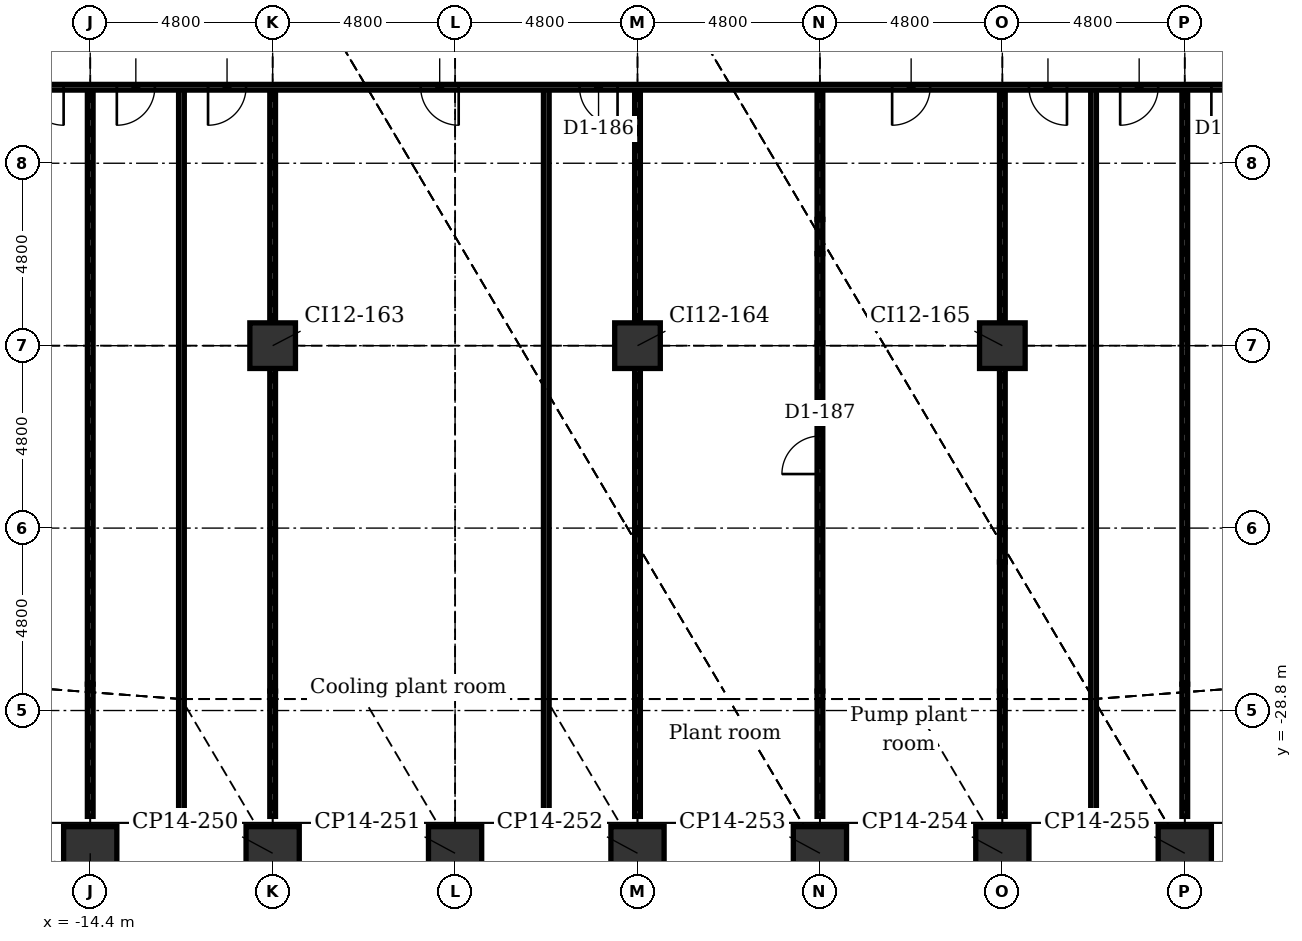
"""IFC4 building model, lengths in metres.
Left out: names, types, materials, properties, quantities, classifications, styles, units other than length and angle.
Written with IfcOpenShell. Run it as: python <this file> out.ifc"""

import sys

from ifc_helpers import new_model, si_unit, direction, frame, frame_2d, origin, origin_2d, place, context, subcontext, project, spatial, rectangle, extrude, element, fill, save


model = new_model("IFC4")
c1 = context("Model", 3, precision=1e-05, world=origin(), true_north=direction((0.0, 1.0)))
c2 = subcontext(c1, "Body", "Model", "MODEL_VIEW")
j1 = project(units=[si_unit("LENGTHUNIT", "METRE"), si_unit("PLANEANGLEUNIT", "RADIAN")], contexts=[c1])
p1 = place(None, origin())
s1 = spatial("IfcSite", under=j1, at=p1, CompositionType="ELEMENT")
p2 = place(p1, origin())
s2 = spatial("IfcBuilding", under=s1, at=p2, CompositionType="ELEMENT")
p3 = place(p2, frame((0.0, 0.0, 71.9)))
s3 = spatial("IfcBuildingStorey", under=s2, at=p3, CompositionType="ELEMENT", Elevation=71.9)
for number, where, z_axis, x_axis in (
    (1, (14.4, -32.555, -0.3), (0.0, 0.0, 1.0), (1.0, 0.0, 0.0)),
    (2, (9.6, -32.555, -0.3), (0.0, 0.0, 1.0), (1.0, 0.0, 0.0)),
    (3, (4.8, -32.555, -0.3), (0.0, 0.0, 1.0), (1.0, 0.0, 0.0)),
    (4, (0.0, -32.555, -0.3), (0.0, 0.0, 1.0), (1.0, 0.0, 0.0)),
    (5, (-4.8, -32.555, -0.3), (0.0, 0.0, 1.0), (1.0, 0.0, 0.0)),
    (6, (-9.6, -32.555, -0.3), (0.0, 0.0, 1.0), (1.0, 0.0, 0.0)),
    (7, (-14.4, -32.555, -0.3), (0.0, 0.0, 1.0), (1.0, 0.0, 0.0)),
):
    element("IfcColumn", number, at=place(p3, frame(where, z_axis=z_axis, x_axis=x_axis)), inside=s3, PredefinedType="COLUMN", context=c2, shape_type="SweptSolid", body=[
        extrude(rectangle(XDim=1.4, YDim=1.4, at=origin_2d()), origin(), (0.0, 0.0, 1.0), 6.1),
    ])
for number, where, z_axis, x_axis in (
    (8, (-9.6, -19.2, -0.3), (0.0, 0.0, 1.0), (1.0, 0.0, 0.0)),
    (9, (0.0, -19.2, -0.3), (0.0, 0.0, 1.0), (1.0, 0.0, 0.0)),
    (10, (9.6, -19.2, -0.3), (0.0, 0.0, 1.0), (1.0, 0.0, 0.0)),
):
    element("IfcColumn", number, at=place(p3, frame(where, z_axis=z_axis, x_axis=x_axis)), inside=s3, PredefinedType="COLUMN", context=c2, shape_type="SweptSolid", body=[
        extrude(rectangle(XDim=1.2, YDim=1.2, at=origin_2d()), origin(), (0.0, 0.0, 1.0), 6.1),
    ])
p4 = place(p3, frame((14.4, -28.107, 0.0), z_axis=(0.0, 0.0, 1.0), x_axis=(0.0, 1.0, 0.0)))
e11 = element("IfcWall", 11, at=p4, inside=s3, PredefinedType="PARTITIONING", context=c2, shape_type="SweptSolid", body=[
    extrude(rectangle(XDim=15.707, YDim=0.15, at=frame_2d((7.854, 0.0))), origin(), (0.0, 0.0, 1.0), 5.343),
])
p5 = place(p3, frame((14.4, -31.585, 0.0), z_axis=(0.0, 0.0, 1.0), x_axis=(0.0, 1.0, 0.0)))
e12 = element("IfcWall", 12, at=p5, inside=s3, PredefinedType="PARTITIONING", context=c2, shape_type="SweptSolid", body=[
    extrude(rectangle(XDim=3.479, YDim=0.15, at=frame_2d((1.739, 0.0))), origin(), (0.0, 0.0, 1.0), 5.8),
])
p6 = place(p3, frame((12.0, -31.585, 0.0), z_axis=(0.0, 0.0, 1.0), x_axis=(0.0, 1.0, 0.0)))
e13 = element("IfcWall", 13, at=p6, inside=s3, PredefinedType="PARTITIONING", context=c2, shape_type="SweptSolid", body=[
    extrude(rectangle(XDim=19.186, YDim=0.15, at=frame_2d((9.593, 0.0))), origin(), (0.0, 0.0, 1.0), 5.8),
])
p7 = place(p3, frame((9.6, -23.99, 0.0), z_axis=(0.0, 0.0, 1.0), x_axis=(0.0, 1.0, 0.0)))
e14 = element("IfcWall", 14, at=p7, inside=s3, PredefinedType="PARTITIONING", context=c2, shape_type="SweptSolid", body=[
    extrude(rectangle(XDim=4.19, YDim=0.15, at=frame_2d((2.095, 0.0))), origin(), (0.0, 0.0, 1.0), 5.49),
])
p8 = place(p3, frame((9.6, -31.585, 0.0), z_axis=(0.0, 0.0, 1.0), x_axis=(0.0, 1.0, 0.0)))
e15 = element("IfcWall", 15, at=p8, inside=s3, PredefinedType="PARTITIONING", context=c2, shape_type="SweptSolid", body=[
    extrude(rectangle(XDim=3.297, YDim=0.15, at=frame_2d((1.648, 0.0))), origin(), (0.0, 0.0, 1.0), 5.8),
])
p9 = place(p3, frame((9.6, -28.289, 0.0), z_axis=(0.0, 0.0, 1.0), x_axis=(0.0, 1.0, 0.0)))
e16 = element("IfcWall", 16, at=p9, inside=s3, PredefinedType="PARTITIONING", context=c2, shape_type="SweptSolid", body=[
    extrude(rectangle(XDim=3.396, YDim=0.15, at=frame_2d((1.698, 0.0))), origin(), (0.0, 0.0, 1.0), 5.49),
])
p10 = place(p3, frame((9.6, -24.893, 0.0), z_axis=(0.0, 0.0, 1.0), x_axis=(0.0, 1.0, 0.0)))
e17 = element("IfcWall", 17, at=p10, inside=s3, PredefinedType="PARTITIONING", context=c2, shape_type="SweptSolid", body=[
    extrude(rectangle(XDim=0.902, YDim=0.15, at=frame_2d((0.451, 0.0))), origin(), (0.0, 0.0, 1.0), 5.8),
])
p11 = place(p3, frame((9.6, -18.6, 0.0), z_axis=(0.0, 0.0, 1.0), x_axis=(0.0, 1.0, 0.0)))
e18 = element("IfcWall", 18, at=p11, inside=s3, PredefinedType="PARTITIONING", context=c2, shape_type="SweptSolid", body=[
    extrude(rectangle(XDim=6.2, YDim=0.15, at=frame_2d((3.1, 0.0))), origin(), (0.0, 0.0, 1.0), 5.343),
])
p12 = place(p3, frame((4.8, -28.289, 0.0), z_axis=(0.0, 0.0, 1.0), x_axis=(0.0, 1.0, 0.0)))
e19 = element("IfcWall", 19, at=p12, inside=s3, PredefinedType="PARTITIONING", context=c2, shape_type="SweptSolid", body=[
    extrude(rectangle(XDim=9.163, YDim=0.15, at=frame_2d((4.581, 0.0))), origin(), (0.0, 0.0, 1.0), 5.343),
])
p13 = place(p12, frame((5.711, 0.0, 0.0)))
e20 = element("IfcOpeningElement", 20, at=p13, cuts=e19, PredefinedType="OPENING", context=c2, shape_type="SweptSolid", body=[
    extrude(rectangle(XDim=1.0, YDim=2.1, at=frame_2d((0.5, 1.05))), frame((0.0, 0.085, 0.0), z_axis=(0.0, -1.0, 0.0), x_axis=(1.0, 0.0, 0.0)), (0.0, 0.0, 1.0), 0.17),
])
p14 = place(p3, frame((4.8, -31.585, 0.0), z_axis=(0.0, 0.0, 1.0), x_axis=(0.0, 1.0, 0.0)))
e21 = element("IfcWall", 21, at=p14, inside=s3, PredefinedType="PARTITIONING", context=c2, shape_type="SweptSolid", body=[
    extrude(rectangle(XDim=3.297, YDim=0.15, at=frame_2d((1.648, 0.0))), origin(), (0.0, 0.0, 1.0), 5.8),
])
p15 = place(p3, frame((4.8, -19.126, 0.0), z_axis=(0.0, 0.0, 1.0), x_axis=(0.0, 1.0, 0.0)))
e22 = element("IfcWall", 22, at=p15, inside=s3, PredefinedType="PARTITIONING", context=c2, shape_type="SweptSolid", body=[
    extrude(rectangle(XDim=2.347, YDim=0.15, at=frame_2d((1.174, 0.0))), origin(), (0.0, 0.0, 1.0), 5.49),
])
p16 = place(p3, frame((4.8, -16.779, 0.0), z_axis=(0.0, 0.0, 1.0), x_axis=(0.0, 1.0, 0.0)))
e23 = element("IfcWall", 23, at=p16, inside=s3, PredefinedType="PARTITIONING", context=c2, shape_type="SweptSolid", body=[
    extrude(rectangle(XDim=0.902, YDim=0.15, at=frame_2d((0.451, 0.0))), origin(), (0.0, 0.0, 1.0), 5.8),
])
p17 = place(p3, frame((4.8, -15.877, 0.0), z_axis=(0.0, 0.0, 1.0), x_axis=(0.0, 1.0, 0.0)))
e24 = element("IfcWall", 24, at=p17, inside=s3, PredefinedType="PARTITIONING", context=c2, shape_type="SweptSolid", body=[
    extrude(rectangle(XDim=3.477, YDim=0.15, at=frame_2d((1.738, 0.0))), origin(), (0.0, 0.0, 1.0), 5.49),
])
p18 = place(p3, frame((0.0, -23.99, 0.0), z_axis=(0.0, 0.0, 1.0), x_axis=(0.0, 1.0, 0.0)))
e25 = element("IfcWall", 25, at=p18, inside=s3, PredefinedType="PARTITIONING", context=c2, shape_type="SweptSolid", body=[
    extrude(rectangle(XDim=4.19, YDim=0.15, at=frame_2d((2.095, 0.0))), origin(), (0.0, 0.0, 1.0), 5.49),
])
p19 = place(p3, frame((0.0, -31.585, 0.0), z_axis=(0.0, 0.0, 1.0), x_axis=(0.0, 1.0, 0.0)))
e26 = element("IfcWall", 26, at=p19, inside=s3, PredefinedType="PARTITIONING", context=c2, shape_type="SweptSolid", body=[
    extrude(rectangle(XDim=3.297, YDim=0.15, at=frame_2d((1.648, 0.0))), origin(), (0.0, 0.0, 1.0), 5.8),
])
p20 = place(p3, frame((0.0, -28.289, 0.0), z_axis=(0.0, 0.0, 1.0), x_axis=(0.0, 1.0, 0.0)))
e27 = element("IfcWall", 27, at=p20, inside=s3, PredefinedType="PARTITIONING", context=c2, shape_type="SweptSolid", body=[
    extrude(rectangle(XDim=3.396, YDim=0.15, at=frame_2d((1.698, 0.0))), origin(), (0.0, 0.0, 1.0), 5.49),
])
p21 = place(p3, frame((0.0, -24.893, 0.0), z_axis=(0.0, 0.0, 1.0), x_axis=(0.0, 1.0, 0.0)))
e28 = element("IfcWall", 28, at=p21, inside=s3, PredefinedType="PARTITIONING", context=c2, shape_type="SweptSolid", body=[
    extrude(rectangle(XDim=0.902, YDim=0.15, at=frame_2d((0.451, 0.0))), origin(), (0.0, 0.0, 1.0), 5.8),
])
p22 = place(p3, frame((0.0, -18.6, 0.0), z_axis=(0.0, 0.0, 1.0), x_axis=(0.0, 1.0, 0.0)))
e29 = element("IfcWall", 29, at=p22, inside=s3, PredefinedType="PARTITIONING", context=c2, shape_type="SweptSolid", body=[
    extrude(rectangle(XDim=6.2, YDim=0.15, at=frame_2d((3.1, 0.0))), origin(), (0.0, 0.0, 1.0), 5.343),
])
p23 = place(p3, frame((-2.4, -31.585, 0.0), z_axis=(0.0, 0.0, 1.0), x_axis=(0.0, 1.0, 0.0)))
e30 = element("IfcWall", 30, at=p23, inside=s3, PredefinedType="PARTITIONING", context=c2, shape_type="SweptSolid", body=[
    extrude(rectangle(XDim=19.186, YDim=0.15, at=frame_2d((9.593, 0.0))), origin(), (0.0, 0.0, 1.0), 5.8),
])
p24 = place(p3, frame((-9.6, -28.289, 0.0), z_axis=(0.0, 0.0, 1.0), x_axis=(0.0, 1.0, 0.0)))
e31 = element("IfcWall", 31, at=p24, inside=s3, PredefinedType="PARTITIONING", context=c2, shape_type="SweptSolid", body=[
    extrude(rectangle(XDim=8.489, YDim=0.15, at=frame_2d((4.244, 0.0))), origin(), (0.0, 0.0, 1.0), 5.343),
])
p25 = place(p3, frame((-9.6, -31.585, 0.0), z_axis=(0.0, 0.0, 1.0), x_axis=(0.0, 1.0, 0.0)))
e32 = element("IfcWall", 32, at=p25, inside=s3, PredefinedType="PARTITIONING", context=c2, shape_type="SweptSolid", body=[
    extrude(rectangle(XDim=3.297, YDim=0.15, at=frame_2d((1.648, 0.0))), origin(), (0.0, 0.0, 1.0), 5.8),
])
p26 = place(p3, frame((-9.6, -18.6, 0.0), z_axis=(0.0, 0.0, 1.0), x_axis=(0.0, 1.0, 0.0)))
e33 = element("IfcWall", 33, at=p26, inside=s3, PredefinedType="PARTITIONING", context=c2, shape_type="SweptSolid", body=[
    extrude(rectangle(XDim=6.2, YDim=0.15, at=frame_2d((3.1, 0.0))), origin(), (0.0, 0.0, 1.0), 5.343),
])
p27 = place(p3, frame((-12.0, -31.585, 0.0), z_axis=(0.0, 0.0, 1.0), x_axis=(0.0, 1.0, 0.0)))
e34 = element("IfcWall", 34, at=p27, inside=s3, PredefinedType="PARTITIONING", context=c2, shape_type="SweptSolid", body=[
    extrude(rectangle(XDim=19.186, YDim=0.15, at=frame_2d((9.593, 0.0))), origin(), (0.0, 0.0, 1.0), 5.8),
])
p28 = place(p3, frame((-14.4, -28.107, 0.0), z_axis=(0.0, 0.0, 1.0), x_axis=(0.0, 1.0, 0.0)))
e35 = element("IfcWall", 35, at=p28, inside=s3, PredefinedType="PARTITIONING", context=c2, shape_type="SweptSolid", body=[
    extrude(rectangle(XDim=15.707, YDim=0.15, at=frame_2d((7.854, 0.0))), origin(), (0.0, 0.0, 1.0), 5.343),
])
p29 = place(p3, frame((-14.4, -31.585, 0.0), z_axis=(0.0, 0.0, 1.0), x_axis=(0.0, 1.0, 0.0)))
e36 = element("IfcWall", 36, at=p29, inside=s3, PredefinedType="PARTITIONING", context=c2, shape_type="SweptSolid", body=[
    extrude(rectangle(XDim=3.479, YDim=0.15, at=frame_2d((1.739, 0.0))), origin(), (0.0, 0.0, 1.0), 5.8),
])
p30 = place(p3, frame((-16.8, -12.4, 0.0), z_axis=(0.0, 0.0, 1.0), x_axis=(1.0, 0.0, 0.0)))
e37 = element("IfcWall", 37, at=p30, inside=s3, PredefinedType="PARTITIONING", context=c2, shape_type="SweptSolid", body=[
    extrude(rectangle(XDim=38.4, YDim=0.15, at=frame_2d((19.2, 0.0))), origin(), (0.0, 0.0, 1.0), 5.8),
])
p31 = place(p30, frame((0.7, 0.0, 0.0)))
e38 = element("IfcOpeningElement", 38, at=p31, cuts=e37, PredefinedType="OPENING", context=c2, shape_type="SweptSolid", body=[
    extrude(rectangle(XDim=1.0, YDim=2.1, at=frame_2d((0.5, 1.05))), frame((0.0, 0.085, 0.0), z_axis=(0.0, -1.0, 0.0), x_axis=(1.0, 0.0, 0.0)), (0.0, 0.0, 1.0), 0.17),
])
p32 = place(p30, frame((3.1, 0.0, 0.0)))
e39 = element("IfcOpeningElement", 39, at=p32, cuts=e37, PredefinedType="OPENING", context=c2, shape_type="SweptSolid", body=[
    extrude(rectangle(XDim=1.0, YDim=2.1, at=frame_2d((0.5, 1.05))), frame((0.0, 0.085, 0.0), z_axis=(0.0, -1.0, 0.0), x_axis=(1.0, 0.0, 0.0)), (0.0, 0.0, 1.0), 0.17),
])
p33 = place(p30, frame((5.5, 0.0, 0.0)))
e40 = element("IfcOpeningElement", 40, at=p33, cuts=e37, PredefinedType="OPENING", context=c2, shape_type="SweptSolid", body=[
    extrude(rectangle(XDim=1.0, YDim=2.1, at=frame_2d((0.5, 1.05))), frame((0.0, 0.085, 0.0), z_axis=(0.0, -1.0, 0.0), x_axis=(1.0, 0.0, 0.0)), (0.0, 0.0, 1.0), 0.17),
])
p34 = place(p30, frame((11.095, 0.0, 0.0)))
e41 = element("IfcOpeningElement", 41, at=p34, cuts=e37, PredefinedType="OPENING", context=c2, shape_type="SweptSolid", body=[
    extrude(rectangle(XDim=1.0, YDim=2.1, at=frame_2d((0.5, 1.05))), frame((0.0, 0.085, 0.0), z_axis=(0.0, -1.0, 0.0), x_axis=(1.0, 0.0, 0.0)), (0.0, 0.0, 1.0), 0.17),
])
p35 = place(p30, frame((15.275, 0.0, 0.0)))
e42 = element("IfcOpeningElement", 42, at=p35, cuts=e37, PredefinedType="OPENING", context=c2, shape_type="SweptSolid", body=[
    extrude(rectangle(XDim=1.0, YDim=2.1, at=frame_2d((0.5, 1.05))), frame((0.0, 0.085, 0.0), z_axis=(0.0, -1.0, 0.0), x_axis=(1.0, 0.0, 0.0)), (0.0, 0.0, 1.0), 0.17),
])
p36 = place(p30, frame((23.5, 0.0, 0.0)))
e43 = element("IfcOpeningElement", 43, at=p36, cuts=e37, PredefinedType="OPENING", context=c2, shape_type="SweptSolid", body=[
    extrude(rectangle(XDim=1.0, YDim=2.1, at=frame_2d((0.5, 1.05))), frame((0.0, 0.085, 0.0), z_axis=(0.0, -1.0, 0.0), x_axis=(1.0, 0.0, 0.0)), (0.0, 0.0, 1.0), 0.17),
])
p37 = place(p30, frame((27.1, 0.0, 0.0)))
e44 = element("IfcOpeningElement", 44, at=p37, cuts=e37, PredefinedType="OPENING", context=c2, shape_type="SweptSolid", body=[
    extrude(rectangle(XDim=1.0, YDim=2.1, at=frame_2d((0.5, 1.05))), frame((0.0, 0.085, 0.0), z_axis=(0.0, -1.0, 0.0), x_axis=(1.0, 0.0, 0.0)), (0.0, 0.0, 1.0), 0.17),
])
p38 = place(p30, frame((29.5, 0.0, 0.0)))
e45 = element("IfcOpeningElement", 45, at=p38, cuts=e37, PredefinedType="OPENING", context=c2, shape_type="SweptSolid", body=[
    extrude(rectangle(XDim=1.0, YDim=2.1, at=frame_2d((0.5, 1.05))), frame((0.0, 0.085, 0.0), z_axis=(0.0, -1.0, 0.0), x_axis=(1.0, 0.0, 0.0)), (0.0, 0.0, 1.0), 0.17),
])
p39 = place(p30, frame((31.9, 0.0, 0.0)))
e46 = element("IfcOpeningElement", 46, at=p39, cuts=e37, PredefinedType="OPENING", context=c2, shape_type="SweptSolid", body=[
    extrude(rectangle(XDim=1.0, YDim=2.1, at=frame_2d((0.5, 1.05))), frame((0.0, 0.085, 0.0), z_axis=(0.0, -1.0, 0.0), x_axis=(1.0, 0.0, 0.0)), (0.0, 0.0, 1.0), 0.17),
])
p40 = place(p31, frame((1.0, 0.0, 0.0), z_axis=(0.0, 0.0, 1.0), x_axis=(-1.0, 0.0, 0.0)))
e47 = element("IfcDoor", 47, at=p40, inside=s3, OperationType="SINGLE_SWING_RIGHT", PredefinedType="DOOR", context=c2, shape_type="SweptSolid", body=[
    extrude(rectangle(XDim=1.0, YDim=2.1, at=frame_2d((0.5, 1.05))), frame((0.0, 0.025, 0.0), z_axis=(0.0, -1.0, 0.0), x_axis=(1.0, 0.0, 0.0)), (0.0, 0.0, 1.0), 0.05),
])
fill(e38, e47)
p41 = place(p32, frame((1.0, 0.0, 0.0), z_axis=(0.0, 0.0, 1.0), x_axis=(-1.0, 0.0, 0.0)))
e48 = element("IfcDoor", 48, at=p41, inside=s3, OperationType="SINGLE_SWING_LEFT", PredefinedType="DOOR", context=c2, shape_type="SweptSolid", body=[
    extrude(rectangle(XDim=1.0, YDim=2.1, at=frame_2d((0.5, 1.05))), frame((0.0, 0.025, 0.0), z_axis=(0.0, -1.0, 0.0), x_axis=(1.0, 0.0, 0.0)), (0.0, 0.0, 1.0), 0.05),
])
fill(e39, e48)
p42 = place(p33, frame((1.0, 0.0, 0.0), z_axis=(0.0, 0.0, 1.0), x_axis=(-1.0, 0.0, 0.0)))
e49 = element("IfcDoor", 49, at=p42, inside=s3, OperationType="SINGLE_SWING_LEFT", PredefinedType="DOOR", context=c2, shape_type="SweptSolid", body=[
    extrude(rectangle(XDim=1.0, YDim=2.1, at=frame_2d((0.5, 1.05))), frame((0.0, 0.025, 0.0), z_axis=(0.0, -1.0, 0.0), x_axis=(1.0, 0.0, 0.0)), (0.0, 0.0, 1.0), 0.05),
])
fill(e40, e49)
p43 = place(p34, frame((1.0, 0.0, 0.0), z_axis=(0.0, 0.0, 1.0), x_axis=(-1.0, 0.0, 0.0)))
e50 = element("IfcDoor", 50, at=p43, inside=s3, OperationType="SINGLE_SWING_RIGHT", PredefinedType="DOOR", context=c2, shape_type="SweptSolid", body=[
    extrude(rectangle(XDim=1.0, YDim=2.1, at=frame_2d((0.5, 1.05))), frame((0.0, 0.025, 0.0), z_axis=(0.0, -1.0, 0.0), x_axis=(1.0, 0.0, 0.0)), (0.0, 0.0, 1.0), 0.05),
])
fill(e41, e50)
p44 = place(p35, frame((1.0, 0.0, 0.0), z_axis=(0.0, 0.0, 1.0), x_axis=(-1.0, 0.0, 0.0)))
e51 = element("IfcDoor", 51, at=p44, inside=s3, OperationType="SINGLE_SWING_RIGHT", PredefinedType="DOOR", context=c2, shape_type="SweptSolid", body=[
    extrude(rectangle(XDim=1.0, YDim=2.1, at=frame_2d((0.5, 1.05))), frame((0.0, 0.025, 0.0), z_axis=(0.0, -1.0, 0.0), x_axis=(1.0, 0.0, 0.0)), (0.0, 0.0, 1.0), 0.05),
])
fill(e42, e51)
p45 = place(p13, origin())
e52 = element("IfcDoor", 52, at=p45, inside=s3, OperationType="SINGLE_SWING_LEFT", PredefinedType="DOOR", context=c2, shape_type="SweptSolid", body=[
    extrude(rectangle(XDim=1.0, YDim=2.1, at=frame_2d((0.5, 1.05))), frame((0.0, 0.025, 0.0), z_axis=(0.0, -1.0, 0.0), x_axis=(1.0, 0.0, 0.0)), (0.0, 0.0, 1.0), 0.05),
])
fill(e20, e52)
p46 = place(p36, frame((1.0, 0.0, 0.0), z_axis=(0.0, 0.0, 1.0), x_axis=(-1.0, 0.0, 0.0)))
e53 = element("IfcDoor", 53, at=p46, inside=s3, OperationType="SINGLE_SWING_LEFT", PredefinedType="DOOR", context=c2, shape_type="SweptSolid", body=[
    extrude(rectangle(XDim=1.0, YDim=2.1, at=frame_2d((0.5, 1.05))), frame((0.0, 0.025, 0.0), z_axis=(0.0, -1.0, 0.0), x_axis=(1.0, 0.0, 0.0)), (0.0, 0.0, 1.0), 0.05),
])
fill(e43, e53)
p47 = place(p37, frame((1.0, 0.0, 0.0), z_axis=(0.0, 0.0, 1.0), x_axis=(-1.0, 0.0, 0.0)))
e54 = element("IfcDoor", 54, at=p47, inside=s3, OperationType="SINGLE_SWING_RIGHT", PredefinedType="DOOR", context=c2, shape_type="SweptSolid", body=[
    extrude(rectangle(XDim=1.0, YDim=2.1, at=frame_2d((0.5, 1.05))), frame((0.0, 0.025, 0.0), z_axis=(0.0, -1.0, 0.0), x_axis=(1.0, 0.0, 0.0)), (0.0, 0.0, 1.0), 0.05),
])
fill(e44, e54)
p48 = place(p38, frame((1.0, 0.0, 0.0), z_axis=(0.0, 0.0, 1.0), x_axis=(-1.0, 0.0, 0.0)))
e55 = element("IfcDoor", 55, at=p48, inside=s3, OperationType="SINGLE_SWING_LEFT", PredefinedType="DOOR", context=c2, shape_type="SweptSolid", body=[
    extrude(rectangle(XDim=1.0, YDim=2.1, at=frame_2d((0.5, 1.05))), frame((0.0, 0.025, 0.0), z_axis=(0.0, -1.0, 0.0), x_axis=(1.0, 0.0, 0.0)), (0.0, 0.0, 1.0), 0.05),
])
fill(e45, e55)
p49 = place(p39, frame((1.0, 0.0, 0.0), z_axis=(0.0, 0.0, 1.0), x_axis=(-1.0, 0.0, 0.0)))
e56 = element("IfcDoor", 56, at=p49, inside=s3, OperationType="SINGLE_SWING_LEFT", PredefinedType="DOOR", context=c2, shape_type="SweptSolid", body=[
    extrude(rectangle(XDim=1.0, YDim=2.1, at=frame_2d((0.5, 1.05))), frame((0.0, 0.025, 0.0), z_axis=(0.0, -1.0, 0.0), x_axis=(1.0, 0.0, 0.0)), (0.0, 0.0, 1.0), 0.05),
])
fill(e46, e56)
save(model, sys.argv[1])
